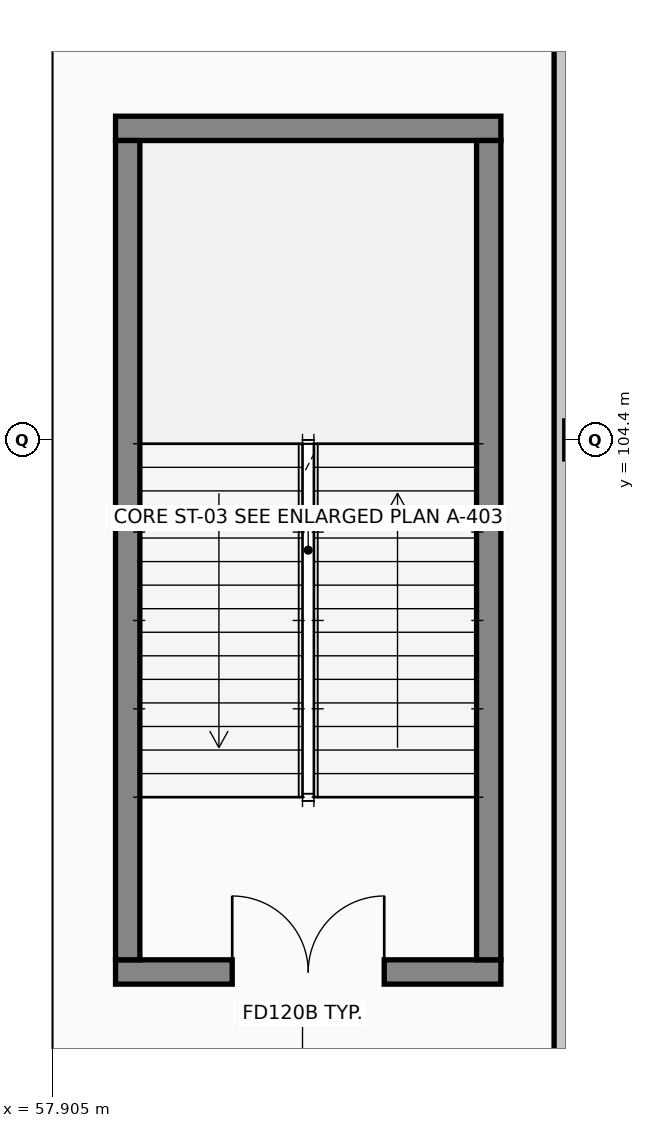
"""IFC4 building model, lengths in metres.
Left out: names, types, materials, properties, quantities, classifications, styles, units other than length and angle.
Written with IfcOpenShell. Run it as: python <this file> out.ifc"""

import sys

from ifc_helpers import new_model, si_unit, direction, frame, frame_2d, origin, place, context, subcontext, project, spatial, rectangle, extrude, element, fill, save


model = new_model("IFC4")
c1 = context("Model", 3, precision=1e-05, world=origin(), true_north=direction((0.0, 1.0)))
c2 = subcontext(c1, "Body", "Model", "MODEL_VIEW")
j1 = project(units=[si_unit("LENGTHUNIT", "METRE"), si_unit("PLANEANGLEUNIT", "RADIAN")], contexts=[c1])
p1 = place(None, origin())
s1 = spatial("IfcSite", under=j1, at=p1, CompositionType="ELEMENT")
p2 = place(p1, origin())
s2 = spatial("IfcBuilding", under=s1, at=p2, CompositionType="ELEMENT")
p3 = place(p2, origin())
s3 = spatial("IfcBuildingStorey", under=s2, at=p3, CompositionType="ELEMENT", Elevation=0.0)
p4 = place(p3, frame((58.74, 97.4, 0.0), z_axis=(0.0, 0.0, 1.0), x_axis=(1.0, 0.0, 0.0)))
e1 = element("IfcWall", 1, at=p4, inside=s3, PredefinedType="SHEAR", context=c2, shape_type="SweptSolid", body=[
    extrude(rectangle(XDim=5.07, YDim=0.32, at=frame_2d((2.535, 0.0))), origin(), (0.0, 0.0, 1.0), 4.58),
])
p5 = place(p4, frame((1.535, 0.0, 0.0)))
e2 = element("IfcOpeningElement", 2, at=p5, cuts=e1, PredefinedType="OPENING", context=c2, shape_type="SweptSolid", body=[
    extrude(rectangle(XDim=2.0, YDim=2.15, at=frame_2d((1.0, 1.075))), frame((0.0, 0.17, 0.0), z_axis=(0.0, -1.0, 0.0), x_axis=(1.0, 0.0, 0.0)), (0.0, 0.0, 1.0), 0.34),
])
p6 = place(p3, frame((58.74, 108.5, 0.0), z_axis=(0.0, 0.0, 1.0), x_axis=(1.0, 0.0, 0.0)))
e3 = element("IfcWall", 3, at=p6, inside=s3, PredefinedType="SHEAR", context=c2, shape_type="SweptSolid", body=[
    extrude(rectangle(XDim=5.07, YDim=0.32, at=frame_2d((2.535, 0.0))), origin(), (0.0, 0.0, 1.0), 4.58),
])
for number, where, z_axis, x_axis in (
    (4, (58.9, 97.56, 0.0), (0.0, 0.0, 1.0), (0.0, 1.0, 0.0)),
    (5, (63.65, 97.56, 0.0), (0.0, 0.0, 1.0), (0.0, 1.0, 0.0)),
):
    element("IfcWall", number, at=place(p3, frame(where, z_axis=z_axis, x_axis=x_axis)), inside=s3, PredefinedType="SHEAR", context=c2, shape_type="SweptSolid", body=[
        extrude(rectangle(XDim=10.78, YDim=0.32, at=frame_2d((5.39, 0.0))), origin(), (0.0, 0.0, 1.0), 4.58),
    ])
p7 = place(p3, frame((64.6, 96.35, 0.0), z_axis=(0.0, 0.0, 1.0), x_axis=(0.0, 1.0, 0.0)))
e6 = element("IfcWall", 6, at=p7, inside=s3, PredefinedType="PARTITIONING", context=c2, shape_type="SweptSolid", body=[
    extrude(rectangle(XDim=13.8, YDim=0.18, at=frame_2d((6.9, 0.0))), origin(), (0.0, 0.0, 1.0), 3.91),
])
p8 = place(p5, origin())
e7 = element("IfcDoor", 7, at=p8, inside=s3, OperationType="DOUBLE_DOOR_SINGLE_SWING", PredefinedType="DOOR", context=c2, shape_type="SweptSolid", body=[
    extrude(rectangle(XDim=2.0, YDim=2.15, at=frame_2d((1.0, 1.075))), frame((0.0, 0.025, 0.0), z_axis=(0.0, -1.0, 0.0), x_axis=(1.0, 0.0, 0.0)), (0.0, 0.0, 1.0), 0.05),
])
fill(e2, e7)
save(model, sys.argv[1])
